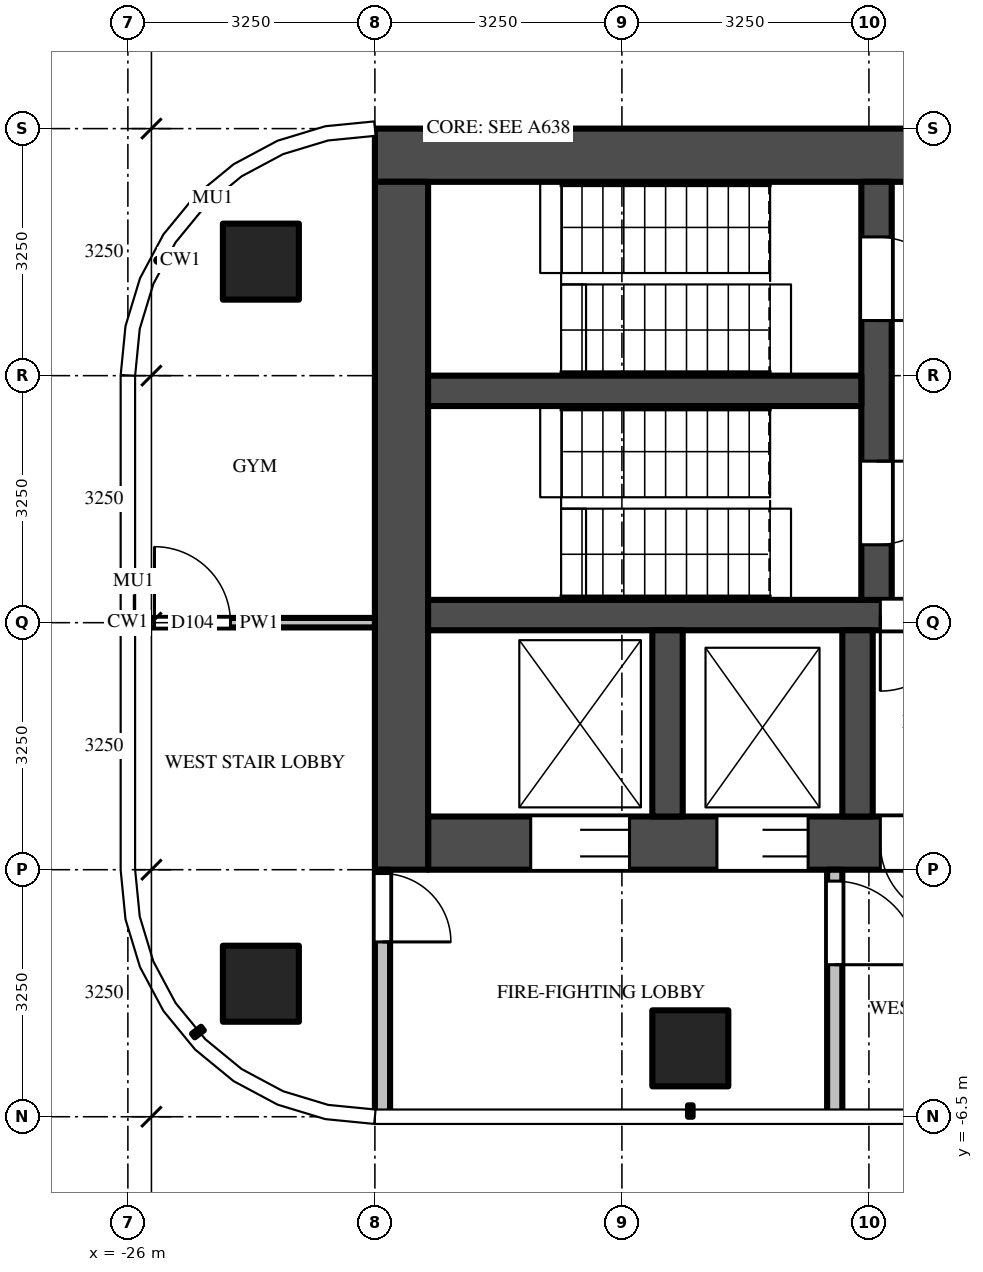
"""IFC4 building model, lengths in metres.
Left out: names, types, materials, properties, quantities, classifications, styles, units other than length and angle.
Written with IfcOpenShell. Run it as: python <this file> out.ifc"""

import sys

from ifc_helpers import new_model, si_unit, direction, frame, frame_2d, origin, origin_2d, place, context, subcontext, project, spatial, rectangle, extrude, source, transform, mapped, element, fill, save


model = new_model("IFC4")
c1 = context("Model", 3, precision=1e-05, world=origin(), true_north=direction((0.0, 1.0)))
c2 = subcontext(c1, "Body", "Model", "MODEL_VIEW")
j1 = project(units=[si_unit("LENGTHUNIT", "METRE"), si_unit("PLANEANGLEUNIT", "RADIAN")], contexts=[c1])
p1 = place(None, origin())
s1 = spatial("IfcSite", under=j1, at=p1, CompositionType="ELEMENT")
p2 = place(p1, origin())
s2 = spatial("IfcBuilding", under=s1, at=p2, CompositionType="ELEMENT")
p3 = place(p2, frame((0.0, 0.0, 295.0)))
s3 = spatial("IfcBuildingStorey", under=s2, at=p3, CompositionType="ELEMENT", Elevation=295.0)
m1 = source(origin(), c2, "Body", "SweptSolid", [
    extrude(rectangle(XDim=1.0, YDim=1.0, at=origin_2d()), origin(), (0.0, 0.0, 1.0), 3.9),
])
for number, where, z_axis, x_axis in (
    (1, (-18.6, -5.6, 0.0), (0.0, 0.0, 1.0), (1.0, 0.0, 0.0)),
    (2, (-24.25, -4.75, 0.0), (0.0, 0.0, 1.0), (1.0, 0.0, 0.0)),
    (3, (-24.25, 4.75, 0.0), (0.0, 0.0, 1.0), (1.0, 0.0, 0.0)),
):
    element("IfcColumn", number, at=place(p3, frame(where, z_axis=z_axis, x_axis=x_axis)), inside=s3, PredefinedType="COLUMN", context=c2, shape_type="MappedRepresentation", body=[
        mapped(m1, transform((0.0, 0.0, 0.0))),
    ])
m2 = source(origin(), c2, "Body", "SweptSolid", [
    extrude(rectangle(XDim=16.65, YDim=0.7, at=frame_2d((8.325, 0.0))), origin(), (0.0, 0.0, 1.0), 3.7),
])
p4 = place(p3, frame((-6.1, 6.15, 0.0), z_axis=(0.0, 0.0, 1.0), x_axis=(-1.0, 0.0, 0.0)))
e4 = element("IfcWall", 4, at=p4, inside=s3, PredefinedType="SHEAR", context=c2, shape_type="MappedRepresentation", body=[
    mapped(m2, transform((0.0, 0.0, 0.0))),
])
m3 = source(origin(), c2, "Body", "SweptSolid", [
    extrude(rectangle(XDim=14.85, YDim=0.7, at=frame_2d((7.425, 0.0))), origin(), (0.0, 0.0, 1.0), 3.7),
])
p5 = place(p3, frame((-7.2, -2.9, 0.0), z_axis=(0.0, 0.0, 1.0), x_axis=(-1.0, 0.0, 0.0)))
e5 = element("IfcWall", 5, at=p5, inside=s3, PredefinedType="SHEAR", context=c2, shape_type="MappedRepresentation", body=[
    mapped(m3, transform((0.0, 0.0, 0.0))),
])
m4 = source(origin(), c2, "Body", "SweptSolid", [
    extrude(rectangle(XDim=1.2, YDim=2.1, at=frame_2d((0.6, 1.05))), frame((0.0, 0.36, 0.0), z_axis=(0.0, -1.0, 0.0), x_axis=(1.0, 0.0, 0.0)), (0.0, 0.0, 1.0), 0.72),
])
p6 = place(p5, frame((5.7, 0.0, 0.0)))
e6 = element("IfcOpeningElement", 6, at=p6, cuts=e5, PredefinedType="OPENING", context=c2, shape_type="MappedRepresentation", body=[
    mapped(m4, transform((0.0, 0.0, 0.0))),
])
m5 = source(origin(), c2, "Body", "SweptSolid", [
    extrude(rectangle(XDim=1.3, YDim=2.1, at=frame_2d((0.65, 1.05))), frame((0.0, 0.36, 0.0), z_axis=(0.0, -1.0, 0.0), x_axis=(1.0, 0.0, 0.0)), (0.0, 0.0, 1.0), 0.72),
])
p7 = place(p5, frame((12.2, 0.0, 0.0)))
e7 = element("IfcOpeningElement", 7, at=p7, cuts=e5, PredefinedType="OPENING", context=c2, shape_type="MappedRepresentation", body=[
    mapped(m5, transform((0.0, 0.0, 0.0))),
])
p8 = place(p5, frame((9.85, 0.0, 0.0)))
e8 = element("IfcOpeningElement", 8, at=p8, cuts=e5, PredefinedType="OPENING", context=c2, shape_type="MappedRepresentation", body=[
    mapped(m4, transform((0.0, 0.0, 0.0))),
])
m6 = source(origin(), c2, "Body", "SweptSolid", [
    extrude(rectangle(XDim=1.0, YDim=2.1, at=frame_2d((0.5, 1.05))), frame((0.0, 0.36, 0.0), z_axis=(0.0, -1.0, 0.0), x_axis=(1.0, 0.0, 0.0)), (0.0, 0.0, 1.0), 0.72),
])
p9 = place(p5, frame((7.9, 0.0, 0.0)))
e9 = element("IfcOpeningElement", 9, at=p9, cuts=e5, PredefinedType="OPENING", context=c2, shape_type="MappedRepresentation", body=[
    mapped(m6, transform((0.0, 0.0, 0.0))),
])
m7 = source(origin(), c2, "Body", "SweptSolid", [
    extrude(rectangle(XDim=0.8, YDim=2.1, at=frame_2d((0.4, 1.05))), frame((0.0, 0.36, 0.0), z_axis=(0.0, -1.0, 0.0), x_axis=(1.0, 0.0, 0.0)), (0.0, 0.0, 1.0), 0.72),
])
p10 = place(p5, frame((0.212, 0.0, 0.0)))
e10 = element("IfcOpeningElement", 10, at=p10, cuts=e5, PredefinedType="OPENING", context=c2, shape_type="MappedRepresentation", body=[
    mapped(m7, transform((0.0, 0.0, 0.0))),
])
p11 = place(p5, frame((1.9, 0.0, 0.0)))
e11 = element("IfcOpeningElement", 11, at=p11, cuts=e5, PredefinedType="OPENING", context=c2, shape_type="MappedRepresentation", body=[
    mapped(m6, transform((0.0, 0.0, 0.0))),
])
p12 = place(p5, frame((3.788, 0.0, 0.0)))
e12 = element("IfcOpeningElement", 12, at=p12, cuts=e5, PredefinedType="OPENING", context=c2, shape_type="MappedRepresentation", body=[
    mapped(m7, transform((0.0, 0.0, 0.0))),
])
m8 = source(origin(), c2, "Body", "SweptSolid", [
    extrude(rectangle(XDim=9.05, YDim=0.7, at=frame_2d((4.525, 0.0))), origin(), (0.0, 0.0, 1.0), 3.7),
])
p13 = place(p3, frame((-22.4, 5.8, 0.0), z_axis=(0.0, 0.0, 1.0), x_axis=(0.0, -1.0, 0.0)))
e13 = element("IfcWall", 13, at=p13, inside=s3, PredefinedType="SHEAR", context=c2, shape_type="MappedRepresentation", body=[
    mapped(m8, transform((0.0, 0.0, 0.0))),
])
m9 = source(origin(), c2, "Body", "SweptSolid", [
    extrude(rectangle(XDim=14.85, YDim=0.4, at=frame_2d((7.425, 0.0))), origin(), (0.0, 0.0, 1.0), 3.7),
])
p14 = place(p3, frame((-7.2, 0.1, 0.0), z_axis=(0.0, 0.0, 1.0), x_axis=(-1.0, 0.0, 0.0)))
e14 = element("IfcWall", 14, at=p14, inside=s3, PredefinedType="SHEAR", context=c2, shape_type="MappedRepresentation", body=[
    mapped(m9, transform((0.0, 0.0, 0.0))),
])
m10 = source(origin(), c2, "Body", "SweptSolid", [
    extrude(rectangle(XDim=1.0, YDim=2.1, at=frame_2d((0.5, 1.05))), frame((0.0, 0.21, 0.0), z_axis=(0.0, -1.0, 0.0), x_axis=(1.0, 0.0, 0.0)), (0.0, 0.0, 1.0), 0.42),
])
p15 = place(p14, frame((7.9, 0.0, 0.0)))
e15 = element("IfcOpeningElement", 15, at=p15, cuts=e14, PredefinedType="OPENING", context=c2, shape_type="MappedRepresentation", body=[
    mapped(m10, transform((0.0, 0.0, 0.0))),
])
m11 = source(origin(), c2, "Body", "SweptSolid", [
    extrude(rectangle(XDim=5.5, YDim=0.4, at=frame_2d((2.75, 0.0))), origin(), (0.0, 0.0, 1.0), 3.7),
])
p16 = place(p3, frame((-16.15, 5.8, 0.0), z_axis=(0.0, 0.0, 1.0), x_axis=(0.0, -1.0, 0.0)))
e16 = element("IfcWall", 16, at=p16, inside=s3, PredefinedType="SHEAR", context=c2, shape_type="MappedRepresentation", body=[
    mapped(m11, transform((0.0, 0.0, 0.0))),
])
m12 = source(origin(), c2, "Body", "SweptSolid", [
    extrude(rectangle(XDim=1.1, YDim=2.1, at=frame_2d((0.55, 1.05))), frame((0.0, 0.21, 0.0), z_axis=(0.0, -1.0, 0.0), x_axis=(1.0, 0.0, 0.0)), (0.0, 0.0, 1.0), 0.42),
])
p17 = place(p16, frame((0.725, 0.0, 0.0)))
e17 = element("IfcOpeningElement", 17, at=p17, cuts=e16, PredefinedType="OPENING", context=c2, shape_type="MappedRepresentation", body=[
    mapped(m12, transform((0.0, 0.0, 0.0))),
])
p18 = place(p16, frame((3.675, 0.0, 0.0)))
e18 = element("IfcOpeningElement", 18, at=p18, cuts=e16, PredefinedType="OPENING", context=c2, shape_type="MappedRepresentation", body=[
    mapped(m12, transform((0.0, 0.0, 0.0))),
])
m13 = source(origin(), c2, "Body", "SweptSolid", [
    extrude(rectangle(XDim=5.7, YDim=0.4, at=frame_2d((2.85, 0.0))), origin(), (0.0, 0.0, 1.0), 3.7),
])
p19 = place(p3, frame((-16.35, 3.05, 0.0), z_axis=(0.0, 0.0, 1.0), x_axis=(-1.0, 0.0, 0.0)))
e19 = element("IfcWall", 19, at=p19, inside=s3, PredefinedType="SHEAR", context=c2, shape_type="MappedRepresentation", body=[
    mapped(m13, transform((0.0, 0.0, 0.0))),
])
m14 = source(origin(), c2, "Body", "SweptSolid", [
    extrude(rectangle(XDim=2.45, YDim=0.4, at=frame_2d((1.225, 0.0))), origin(), (0.0, 0.0, 1.0), 3.7),
])
for number, where, z_axis, x_axis in (
    (20, (-16.4, -0.1, 0.0), (0.0, 0.0, 1.0), (0.0, -1.0, 0.0)),
    (21, (-18.9, -0.1, 0.0), (0.0, 0.0, 1.0), (0.0, -1.0, 0.0)),
):
    element("IfcWall", number, at=place(p3, frame(where, z_axis=z_axis, x_axis=x_axis)), inside=s3, PredefinedType="SHEAR", context=c2, shape_type="MappedRepresentation", body=[
        mapped(m14, transform((0.0, 0.0, 0.0))),
    ])
m15 = source(origin(), c2, "Body", "SweptSolid", [
    extrude(rectangle(XDim=3.25, YDim=0.2, at=frame_2d((1.625, 0.0))), origin(), (0.0, 0.0, 1.0), 3.7),
])
p20 = place(p3, frame((-16.7, -3.25, 0.0), z_axis=(0.0, 0.0, 1.0), x_axis=(0.0, -1.0, 0.0)))
e22 = element("IfcWall", 22, at=p20, inside=s3, PredefinedType="PARTITIONING", context=c2, shape_type="MappedRepresentation", body=[
    mapped(m15, transform((0.0, 0.0, 0.0))),
])
m16 = source(origin(), c2, "Body", "SweptSolid", [
    extrude(rectangle(XDim=1.1, YDim=2.1, at=frame_2d((0.55, 1.05))), frame((0.0, 0.11, 0.0), z_axis=(0.0, -1.0, 0.0), x_axis=(1.0, 0.0, 0.0)), (0.0, 0.0, 1.0), 0.22),
])
p21 = place(p20, frame((0.15, 0.0, 0.0)))
e23 = element("IfcOpeningElement", 23, at=p21, cuts=e22, PredefinedType="OPENING", context=c2, shape_type="MappedRepresentation", body=[
    mapped(m16, transform((0.0, 0.0, 0.0))),
])
p22 = place(p3, frame((-22.65, -3.25, 0.0), z_axis=(0.0, 0.0, 1.0), x_axis=(0.0, -1.0, 0.0)))
e24 = element("IfcWall", 24, at=p22, inside=s3, PredefinedType="PARTITIONING", context=c2, shape_type="MappedRepresentation", body=[
    mapped(m15, transform((0.0, 0.0, 0.0))),
])
m17 = source(origin(), c2, "Body", "SweptSolid", [
    extrude(rectangle(XDim=0.9, YDim=2.1, at=frame_2d((0.45, 1.05))), frame((0.0, 0.11, 0.0), z_axis=(0.0, -1.0, 0.0), x_axis=(1.0, 0.0, 0.0)), (0.0, 0.0, 1.0), 0.22),
])
p23 = place(p22, frame((0.05, 0.0, 0.0)))
e25 = element("IfcOpeningElement", 25, at=p23, cuts=e24, PredefinedType="OPENING", context=c2, shape_type="MappedRepresentation", body=[
    mapped(m17, transform((0.0, 0.0, 0.0))),
])
m18 = source(origin(), c2, "Body", "SweptSolid", [
    extrude(rectangle(XDim=3.05, YDim=0.125, at=frame_2d((1.525, 0.0))), origin(), (0.0, 0.0, 1.0), 2.78),
])
p24 = place(p3, frame((-25.8, 0.0, 0.0), z_axis=(0.0, 0.0, 1.0), x_axis=(1.0, 0.0, 0.0)))
e26 = element("IfcWall", 26, at=p24, inside=s3, PredefinedType="PARTITIONING", context=c2, shape_type="MappedRepresentation", body=[
    mapped(m18, transform((0.0, 0.0, 0.0))),
])
m19 = source(origin(), c2, "Body", "SweptSolid", [
    extrude(rectangle(XDim=1.0, YDim=2.1, at=frame_2d((0.5, 1.05))), frame((0.0, 0.073, 0.0), z_axis=(0.0, -1.0, 0.0), x_axis=(1.0, 0.0, 0.0)), (0.0, 0.0, 1.0), 0.145),
])
p25 = place(p24, frame((0.15, 0.0, 0.0)))
e27 = element("IfcOpeningElement", 27, at=p25, cuts=e26, PredefinedType="OPENING", context=c2, shape_type="MappedRepresentation", body=[
    mapped(m19, transform((0.0, 0.0, 0.0))),
])
m20 = source(origin(), c2, "Body", "SweptSolid", [
    extrude(rectangle(XDim=1.3, YDim=2.1, at=frame_2d((0.65, 1.05))), frame((0.0, -0.275, 0.0), z_axis=(0.0, -1.0, 0.0), x_axis=(1.0, 0.0, 0.0)), (0.0, 0.0, 1.0), 0.05),
])
p26 = place(p7, origin())
e28 = element("IfcDoor", 28, at=p26, inside=s3, OperationType="DOUBLE_DOOR_SLIDING", PredefinedType="DOOR", context=c2, shape_type="MappedRepresentation", body=[
    mapped(m20, transform((0.0, 0.0, 0.0))),
])
fill(e7, e28)
m21 = source(origin(), c2, "Body", "SweptSolid", [
    extrude(rectangle(XDim=1.2, YDim=2.1, at=frame_2d((0.6, 1.05))), frame((0.0, -0.275, 0.0), z_axis=(0.0, -1.0, 0.0), x_axis=(1.0, 0.0, 0.0)), (0.0, 0.0, 1.0), 0.05),
])
p27 = place(p8, origin())
e29 = element("IfcDoor", 29, at=p27, inside=s3, OperationType="DOUBLE_DOOR_SLIDING", PredefinedType="DOOR", context=c2, shape_type="MappedRepresentation", body=[
    mapped(m21, transform((0.0, 0.0, 0.0))),
])
fill(e8, e29)
m22 = source(origin(), c2, "Body", "SweptSolid", [
    extrude(rectangle(XDim=1.1, YDim=2.1, at=frame_2d((0.55, 1.05))), frame((0.0, 0.025, 0.0), z_axis=(0.0, -1.0, 0.0), x_axis=(1.0, 0.0, 0.0)), (0.0, 0.0, 1.0), 0.05),
])
p28 = place(p17, origin())
e30 = element("IfcDoor", 30, at=p28, inside=s3, OperationType="SINGLE_SWING_RIGHT", PredefinedType="DOOR", context=c2, shape_type="MappedRepresentation", body=[
    mapped(m22, transform((0.0, 0.0, 0.0))),
])
fill(e17, e30)
p29 = place(p18, origin())
e31 = element("IfcDoor", 31, at=p29, inside=s3, OperationType="SINGLE_SWING_LEFT", PredefinedType="DOOR", context=c2, shape_type="MappedRepresentation", body=[
    mapped(m22, transform((0.0, 0.0, 0.0))),
])
fill(e18, e31)
m23 = source(origin(), c2, "Body", "SweptSolid", [
    extrude(rectangle(XDim=1.0, YDim=2.1, at=frame_2d((0.5, 1.05))), frame((0.0, 0.025, 0.0), z_axis=(0.0, -1.0, 0.0), x_axis=(1.0, 0.0, 0.0)), (0.0, 0.0, 1.0), 0.05),
])
p30 = place(p15, origin())
e32 = element("IfcDoor", 32, at=p30, inside=s3, OperationType="SINGLE_SWING_RIGHT", PredefinedType="DOOR", context=c2, shape_type="MappedRepresentation", body=[
    mapped(m23, transform((0.0, 0.0, 0.0))),
])
fill(e15, e32)
m24 = source(origin(), c2, "Body", "SweptSolid", [
    extrude(rectangle(XDim=1.0, YDim=2.1, at=frame_2d((0.5, 1.05))), frame((0.0, -0.275, 0.0), z_axis=(0.0, -1.0, 0.0), x_axis=(1.0, 0.0, 0.0)), (0.0, 0.0, 1.0), 0.05),
])
p31 = place(p9, origin())
e33 = element("IfcDoor", 33, at=p31, inside=s3, OperationType="SINGLE_SWING_LEFT", PredefinedType="DOOR", context=c2, shape_type="MappedRepresentation", body=[
    mapped(m24, transform((0.0, 0.0, 0.0))),
])
fill(e9, e33)
p32 = place(p21, origin())
e34 = element("IfcDoor", 34, at=p32, inside=s3, OperationType="SINGLE_SWING_RIGHT", PredefinedType="DOOR", context=c2, shape_type="MappedRepresentation", body=[
    mapped(m22, transform((0.0, 0.0, 0.0))),
])
fill(e23, e34)
m25 = source(origin(), c2, "Body", "SweptSolid", [
    extrude(rectangle(XDim=0.9, YDim=2.1, at=frame_2d((0.45, 1.05))), frame((0.0, 0.025, 0.0), z_axis=(0.0, -1.0, 0.0), x_axis=(1.0, 0.0, 0.0)), (0.0, 0.0, 1.0), 0.05),
])
p33 = place(p23, origin())
e35 = element("IfcDoor", 35, at=p33, inside=s3, OperationType="SINGLE_SWING_RIGHT", PredefinedType="DOOR", context=c2, shape_type="MappedRepresentation", body=[
    mapped(m25, transform((0.0, 0.0, 0.0))),
])
fill(e25, e35)
p34 = place(p25, origin())
e36 = element("IfcDoor", 36, at=p34, inside=s3, OperationType="SINGLE_SWING_LEFT", PredefinedType="DOOR", context=c2, shape_type="MappedRepresentation", body=[
    mapped(m23, transform((0.0, 0.0, 0.0))),
])
fill(e27, e36)
save(model, sys.argv[1])
